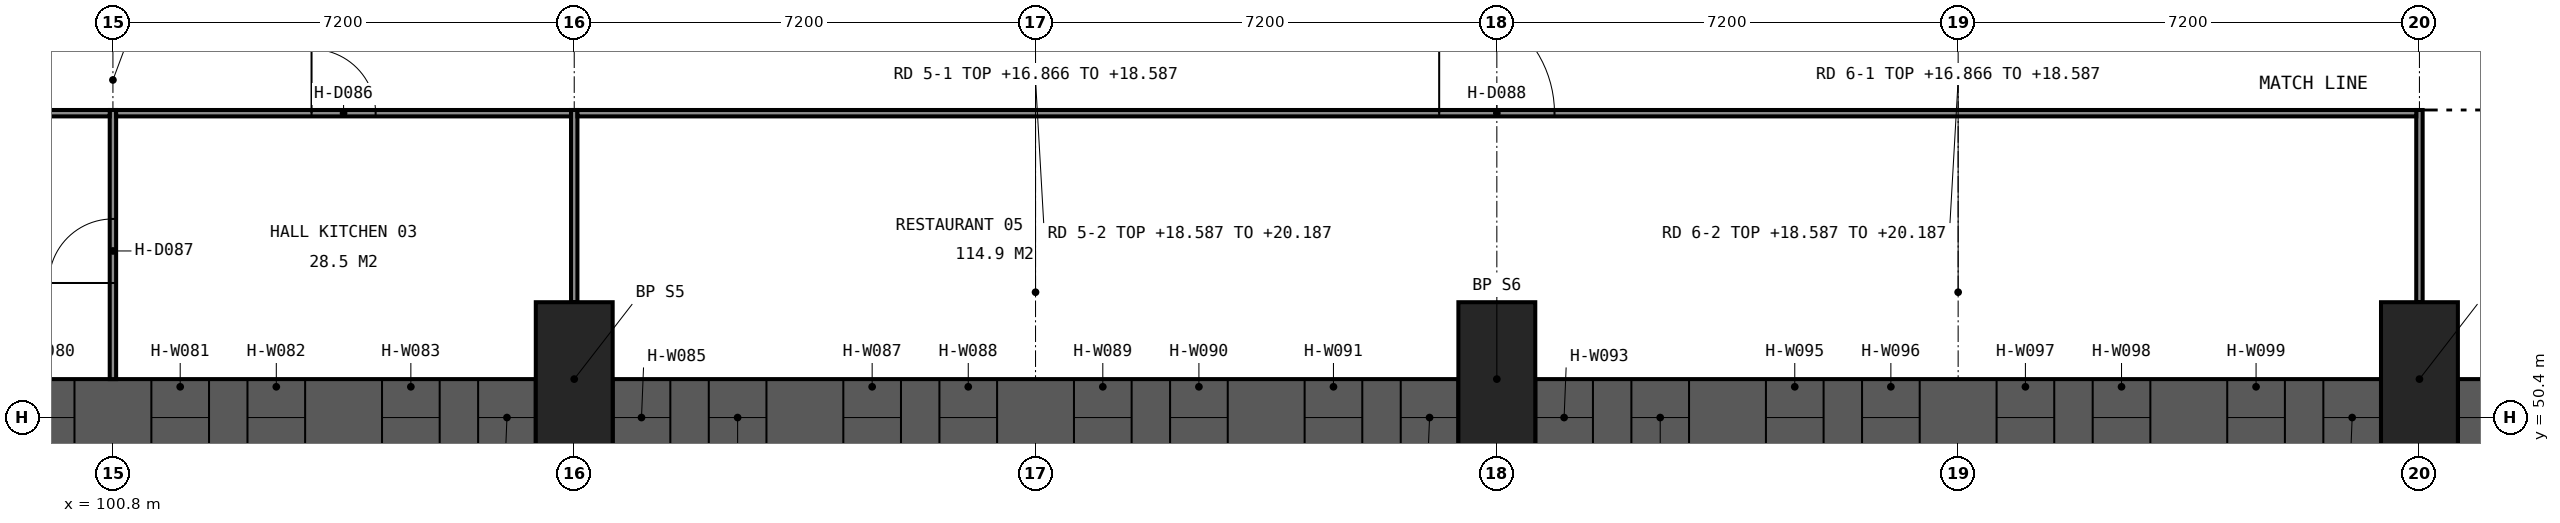
"""IFC4 building model, lengths in metres.
Left out: names, types, materials, properties, quantities, classifications, styles, units other than length and angle.
Written with IfcOpenShell. Run it as: python <this file> out.ifc"""

import sys

from ifc_helpers import new_model, si_unit, direction, frame, frame_2d, origin, origin_2d, place, context, subcontext, project, spatial, rectangle, extrude, element, fill, save


model = new_model("IFC4")
c1 = context("Model", 3, precision=1e-05, world=origin(), true_north=direction((0.0, 1.0)))
c2 = subcontext(c1, "Body", "Model", "MODEL_VIEW")
j1 = project(units=[si_unit("LENGTHUNIT", "METRE"), si_unit("PLANEANGLEUNIT", "RADIAN")], contexts=[c1])
p1 = place(None, origin())
s1 = spatial("IfcSite", under=j1, at=p1, CompositionType="ELEMENT")
p2 = place(p1, origin())
s2 = spatial("IfcBuilding", under=s1, at=p2, CompositionType="ELEMENT")
p3 = place(p2, frame((0.0, 0.0, 9.6)))
s3 = spatial("IfcBuildingStorey", under=s2, at=p3, CompositionType="ELEMENT", Elevation=9.6)
for number, where, z_axis, x_axis in (
    (1, (108.0, 51.0, 0.0), (0.0, 0.0, 1.0), (1.0, 0.0, 0.0)),
    (2, (122.4, 51.0, 0.0), (0.0, 0.0, 1.0), (1.0, 0.0, 0.0)),
    (3, (136.8, 51.0, 0.0), (0.0, 0.0, 1.0), (1.0, 0.0, 0.0)),
):
    element("IfcColumn", number, at=place(p3, frame(where, z_axis=z_axis, x_axis=x_axis)), inside=s3, PredefinedType="COLUMN", context=c2, shape_type="SweptSolid", body=[
        extrude(rectangle(XDim=1.2, YDim=2.4, at=origin_2d()), origin(), (0.0, 0.0, 1.0), 5.4),
    ])
p4 = place(p3, frame((94.2, 50.4, 0.0), z_axis=(0.0, 0.0, 1.0), x_axis=(1.0, 0.0, 0.0)))
e4 = element("IfcWall", 4, at=p4, inside=s3, PredefinedType="SOLIDWALL", context=c2, shape_type="SweptSolid", body=[
    extrude(rectangle(XDim=13.2, YDim=1.2, at=frame_2d((6.6, 0.0))), origin(), (0.0, 0.0, 1.0), 6.6),
])
p5 = place(p4, frame((0.0, 0.0, 1.2)))
e5 = element("IfcOpeningElement", 5, at=p5, cuts=e4, PredefinedType="OPENING", context=c2, shape_type="SweptSolid", body=[
    extrude(rectangle(XDim=0.9, YDim=4.5, at=frame_2d((0.45, 2.25))), frame((0.0, 0.61, 0.0), z_axis=(0.0, -1.0, 0.0), x_axis=(1.0, 0.0, 0.0)), (0.0, 0.0, 1.0), 1.22),
])
p6 = place(p4, frame((1.5, 0.0, 1.2)))
e6 = element("IfcOpeningElement", 6, at=p6, cuts=e4, PredefinedType="OPENING", context=c2, shape_type="SweptSolid", body=[
    extrude(rectangle(XDim=0.9, YDim=4.5, at=frame_2d((0.45, 2.25))), frame((0.0, 0.61, 0.0), z_axis=(0.0, -1.0, 0.0), x_axis=(1.0, 0.0, 0.0)), (0.0, 0.0, 1.0), 1.22),
])
p7 = place(p4, frame((3.6, 0.0, 1.2)))
e7 = element("IfcOpeningElement", 7, at=p7, cuts=e4, PredefinedType="OPENING", context=c2, shape_type="SweptSolid", body=[
    extrude(rectangle(XDim=0.9, YDim=4.5, at=frame_2d((0.45, 2.25))), frame((0.0, 0.61, 0.0), z_axis=(0.0, -1.0, 0.0), x_axis=(1.0, 0.0, 0.0)), (0.0, 0.0, 1.0), 1.22),
])
p8 = place(p4, frame((5.1, 0.0, 1.2)))
e8 = element("IfcOpeningElement", 8, at=p8, cuts=e4, PredefinedType="OPENING", context=c2, shape_type="SweptSolid", body=[
    extrude(rectangle(XDim=0.9, YDim=4.5, at=frame_2d((0.45, 2.25))), frame((0.0, 0.61, 0.0), z_axis=(0.0, -1.0, 0.0), x_axis=(1.0, 0.0, 0.0)), (0.0, 0.0, 1.0), 1.22),
])
p9 = place(p4, frame((7.2, 0.0, 1.2)))
e9 = element("IfcOpeningElement", 9, at=p9, cuts=e4, PredefinedType="OPENING", context=c2, shape_type="SweptSolid", body=[
    extrude(rectangle(XDim=0.9, YDim=4.5, at=frame_2d((0.45, 2.25))), frame((0.0, 0.61, 0.0), z_axis=(0.0, -1.0, 0.0), x_axis=(1.0, 0.0, 0.0)), (0.0, 0.0, 1.0), 1.22),
])
p10 = place(p4, frame((8.7, 0.0, 1.2)))
e10 = element("IfcOpeningElement", 10, at=p10, cuts=e4, PredefinedType="OPENING", context=c2, shape_type="SweptSolid", body=[
    extrude(rectangle(XDim=0.9, YDim=4.5, at=frame_2d((0.45, 2.25))), frame((0.0, 0.61, 0.0), z_axis=(0.0, -1.0, 0.0), x_axis=(1.0, 0.0, 0.0)), (0.0, 0.0, 1.0), 1.22),
])
p11 = place(p4, frame((10.8, 0.0, 1.2)))
e11 = element("IfcOpeningElement", 11, at=p11, cuts=e4, PredefinedType="OPENING", context=c2, shape_type="SweptSolid", body=[
    extrude(rectangle(XDim=0.9, YDim=4.5, at=frame_2d((0.45, 2.25))), frame((0.0, 0.61, 0.0), z_axis=(0.0, -1.0, 0.0), x_axis=(1.0, 0.0, 0.0)), (0.0, 0.0, 1.0), 1.22),
])
p12 = place(p4, frame((12.3, 0.0, 1.2)))
e12 = element("IfcOpeningElement", 12, at=p12, cuts=e4, PredefinedType="OPENING", context=c2, shape_type="SweptSolid", body=[
    extrude(rectangle(XDim=0.9, YDim=4.5, at=frame_2d((0.45, 2.25))), frame((0.0, 0.61, 0.0), z_axis=(0.0, -1.0, 0.0), x_axis=(1.0, 0.0, 0.0)), (0.0, 0.0, 1.0), 1.22),
])
p13 = place(p3, frame((108.6, 50.4, 0.0), z_axis=(0.0, 0.0, 1.0), x_axis=(1.0, 0.0, 0.0)))
e13 = element("IfcWall", 13, at=p13, inside=s3, PredefinedType="SOLIDWALL", context=c2, shape_type="SweptSolid", body=[
    extrude(rectangle(XDim=13.2, YDim=1.2, at=frame_2d((6.6, 0.0))), origin(), (0.0, 0.0, 1.0), 6.6),
])
p14 = place(p13, frame((0.0, 0.0, 1.2)))
e14 = element("IfcOpeningElement", 14, at=p14, cuts=e13, PredefinedType="OPENING", context=c2, shape_type="SweptSolid", body=[
    extrude(rectangle(XDim=0.9, YDim=4.5, at=frame_2d((0.45, 2.25))), frame((0.0, 0.61, 0.0), z_axis=(0.0, -1.0, 0.0), x_axis=(1.0, 0.0, 0.0)), (0.0, 0.0, 1.0), 1.22),
])
p15 = place(p13, frame((1.5, 0.0, 1.2)))
e15 = element("IfcOpeningElement", 15, at=p15, cuts=e13, PredefinedType="OPENING", context=c2, shape_type="SweptSolid", body=[
    extrude(rectangle(XDim=0.9, YDim=4.5, at=frame_2d((0.45, 2.25))), frame((0.0, 0.61, 0.0), z_axis=(0.0, -1.0, 0.0), x_axis=(1.0, 0.0, 0.0)), (0.0, 0.0, 1.0), 1.22),
])
p16 = place(p13, frame((3.6, 0.0, 1.2)))
e16 = element("IfcOpeningElement", 16, at=p16, cuts=e13, PredefinedType="OPENING", context=c2, shape_type="SweptSolid", body=[
    extrude(rectangle(XDim=0.9, YDim=4.5, at=frame_2d((0.45, 2.25))), frame((0.0, 0.61, 0.0), z_axis=(0.0, -1.0, 0.0), x_axis=(1.0, 0.0, 0.0)), (0.0, 0.0, 1.0), 1.22),
])
p17 = place(p13, frame((5.1, 0.0, 1.2)))
e17 = element("IfcOpeningElement", 17, at=p17, cuts=e13, PredefinedType="OPENING", context=c2, shape_type="SweptSolid", body=[
    extrude(rectangle(XDim=0.9, YDim=4.5, at=frame_2d((0.45, 2.25))), frame((0.0, 0.61, 0.0), z_axis=(0.0, -1.0, 0.0), x_axis=(1.0, 0.0, 0.0)), (0.0, 0.0, 1.0), 1.22),
])
p18 = place(p13, frame((7.2, 0.0, 1.2)))
e18 = element("IfcOpeningElement", 18, at=p18, cuts=e13, PredefinedType="OPENING", context=c2, shape_type="SweptSolid", body=[
    extrude(rectangle(XDim=0.9, YDim=4.5, at=frame_2d((0.45, 2.25))), frame((0.0, 0.61, 0.0), z_axis=(0.0, -1.0, 0.0), x_axis=(1.0, 0.0, 0.0)), (0.0, 0.0, 1.0), 1.22),
])
p19 = place(p13, frame((8.7, 0.0, 1.2)))
e19 = element("IfcOpeningElement", 19, at=p19, cuts=e13, PredefinedType="OPENING", context=c2, shape_type="SweptSolid", body=[
    extrude(rectangle(XDim=0.9, YDim=4.5, at=frame_2d((0.45, 2.25))), frame((0.0, 0.61, 0.0), z_axis=(0.0, -1.0, 0.0), x_axis=(1.0, 0.0, 0.0)), (0.0, 0.0, 1.0), 1.22),
])
p20 = place(p13, frame((10.8, 0.0, 1.2)))
e20 = element("IfcOpeningElement", 20, at=p20, cuts=e13, PredefinedType="OPENING", context=c2, shape_type="SweptSolid", body=[
    extrude(rectangle(XDim=0.9, YDim=4.5, at=frame_2d((0.45, 2.25))), frame((0.0, 0.61, 0.0), z_axis=(0.0, -1.0, 0.0), x_axis=(1.0, 0.0, 0.0)), (0.0, 0.0, 1.0), 1.22),
])
p21 = place(p13, frame((12.3, 0.0, 1.2)))
e21 = element("IfcOpeningElement", 21, at=p21, cuts=e13, PredefinedType="OPENING", context=c2, shape_type="SweptSolid", body=[
    extrude(rectangle(XDim=0.9, YDim=4.5, at=frame_2d((0.45, 2.25))), frame((0.0, 0.61, 0.0), z_axis=(0.0, -1.0, 0.0), x_axis=(1.0, 0.0, 0.0)), (0.0, 0.0, 1.0), 1.22),
])
p22 = place(p3, frame((123.0, 50.4, 0.0), z_axis=(0.0, 0.0, 1.0), x_axis=(1.0, 0.0, 0.0)))
e22 = element("IfcWall", 22, at=p22, inside=s3, PredefinedType="SOLIDWALL", context=c2, shape_type="SweptSolid", body=[
    extrude(rectangle(XDim=13.2, YDim=1.2, at=frame_2d((6.6, 0.0))), origin(), (0.0, 0.0, 1.0), 6.6),
])
p23 = place(p22, frame((0.0, 0.0, 1.2)))
e23 = element("IfcOpeningElement", 23, at=p23, cuts=e22, PredefinedType="OPENING", context=c2, shape_type="SweptSolid", body=[
    extrude(rectangle(XDim=0.9, YDim=4.5, at=frame_2d((0.45, 2.25))), frame((0.0, 0.61, 0.0), z_axis=(0.0, -1.0, 0.0), x_axis=(1.0, 0.0, 0.0)), (0.0, 0.0, 1.0), 1.22),
])
p24 = place(p22, frame((1.5, 0.0, 1.2)))
e24 = element("IfcOpeningElement", 24, at=p24, cuts=e22, PredefinedType="OPENING", context=c2, shape_type="SweptSolid", body=[
    extrude(rectangle(XDim=0.9, YDim=4.5, at=frame_2d((0.45, 2.25))), frame((0.0, 0.61, 0.0), z_axis=(0.0, -1.0, 0.0), x_axis=(1.0, 0.0, 0.0)), (0.0, 0.0, 1.0), 1.22),
])
p25 = place(p22, frame((3.6, 0.0, 1.2)))
e25 = element("IfcOpeningElement", 25, at=p25, cuts=e22, PredefinedType="OPENING", context=c2, shape_type="SweptSolid", body=[
    extrude(rectangle(XDim=0.9, YDim=4.5, at=frame_2d((0.45, 2.25))), frame((0.0, 0.61, 0.0), z_axis=(0.0, -1.0, 0.0), x_axis=(1.0, 0.0, 0.0)), (0.0, 0.0, 1.0), 1.22),
])
p26 = place(p22, frame((5.1, 0.0, 1.2)))
e26 = element("IfcOpeningElement", 26, at=p26, cuts=e22, PredefinedType="OPENING", context=c2, shape_type="SweptSolid", body=[
    extrude(rectangle(XDim=0.9, YDim=4.5, at=frame_2d((0.45, 2.25))), frame((0.0, 0.61, 0.0), z_axis=(0.0, -1.0, 0.0), x_axis=(1.0, 0.0, 0.0)), (0.0, 0.0, 1.0), 1.22),
])
p27 = place(p22, frame((7.2, 0.0, 1.2)))
e27 = element("IfcOpeningElement", 27, at=p27, cuts=e22, PredefinedType="OPENING", context=c2, shape_type="SweptSolid", body=[
    extrude(rectangle(XDim=0.9, YDim=4.5, at=frame_2d((0.45, 2.25))), frame((0.0, 0.61, 0.0), z_axis=(0.0, -1.0, 0.0), x_axis=(1.0, 0.0, 0.0)), (0.0, 0.0, 1.0), 1.22),
])
p28 = place(p22, frame((8.7, 0.0, 1.2)))
e28 = element("IfcOpeningElement", 28, at=p28, cuts=e22, PredefinedType="OPENING", context=c2, shape_type="SweptSolid", body=[
    extrude(rectangle(XDim=0.9, YDim=4.5, at=frame_2d((0.45, 2.25))), frame((0.0, 0.61, 0.0), z_axis=(0.0, -1.0, 0.0), x_axis=(1.0, 0.0, 0.0)), (0.0, 0.0, 1.0), 1.22),
])
p29 = place(p22, frame((10.8, 0.0, 1.2)))
e29 = element("IfcOpeningElement", 29, at=p29, cuts=e22, PredefinedType="OPENING", context=c2, shape_type="SweptSolid", body=[
    extrude(rectangle(XDim=0.9, YDim=4.5, at=frame_2d((0.45, 2.25))), frame((0.0, 0.61, 0.0), z_axis=(0.0, -1.0, 0.0), x_axis=(1.0, 0.0, 0.0)), (0.0, 0.0, 1.0), 1.22),
])
p30 = place(p22, frame((12.3, 0.0, 1.2)))
e30 = element("IfcOpeningElement", 30, at=p30, cuts=e22, PredefinedType="OPENING", context=c2, shape_type="SweptSolid", body=[
    extrude(rectangle(XDim=0.9, YDim=4.5, at=frame_2d((0.45, 2.25))), frame((0.0, 0.61, 0.0), z_axis=(0.0, -1.0, 0.0), x_axis=(1.0, 0.0, 0.0)), (0.0, 0.0, 1.0), 1.22),
])
p31 = place(p3, frame((137.4, 50.4, 0.0), z_axis=(0.0, 0.0, 1.0), x_axis=(1.0, 0.0, 0.0)))
e31 = element("IfcWall", 31, at=p31, inside=s3, PredefinedType="SOLIDWALL", context=c2, shape_type="SweptSolid", body=[
    extrude(rectangle(XDim=13.2, YDim=1.2, at=frame_2d((6.6, 0.0))), origin(), (0.0, 0.0, 1.0), 6.6),
])
p32 = place(p31, frame((0.0, 0.0, 1.2)))
e32 = element("IfcOpeningElement", 32, at=p32, cuts=e31, PredefinedType="OPENING", context=c2, shape_type="SweptSolid", body=[
    extrude(rectangle(XDim=0.9, YDim=4.5, at=frame_2d((0.45, 2.25))), frame((0.0, 0.61, 0.0), z_axis=(0.0, -1.0, 0.0), x_axis=(1.0, 0.0, 0.0)), (0.0, 0.0, 1.0), 1.22),
])
p33 = place(p31, frame((1.5, 0.0, 1.2)))
e33 = element("IfcOpeningElement", 33, at=p33, cuts=e31, PredefinedType="OPENING", context=c2, shape_type="SweptSolid", body=[
    extrude(rectangle(XDim=0.9, YDim=4.5, at=frame_2d((0.45, 2.25))), frame((0.0, 0.61, 0.0), z_axis=(0.0, -1.0, 0.0), x_axis=(1.0, 0.0, 0.0)), (0.0, 0.0, 1.0), 1.22),
])
p34 = place(p31, frame((3.6, 0.0, 1.2)))
e34 = element("IfcOpeningElement", 34, at=p34, cuts=e31, PredefinedType="OPENING", context=c2, shape_type="SweptSolid", body=[
    extrude(rectangle(XDim=0.9, YDim=4.5, at=frame_2d((0.45, 2.25))), frame((0.0, 0.61, 0.0), z_axis=(0.0, -1.0, 0.0), x_axis=(1.0, 0.0, 0.0)), (0.0, 0.0, 1.0), 1.22),
])
p35 = place(p31, frame((5.1, 0.0, 1.2)))
e35 = element("IfcOpeningElement", 35, at=p35, cuts=e31, PredefinedType="OPENING", context=c2, shape_type="SweptSolid", body=[
    extrude(rectangle(XDim=0.9, YDim=4.5, at=frame_2d((0.45, 2.25))), frame((0.0, 0.61, 0.0), z_axis=(0.0, -1.0, 0.0), x_axis=(1.0, 0.0, 0.0)), (0.0, 0.0, 1.0), 1.22),
])
p36 = place(p31, frame((7.2, 0.0, 1.2)))
e36 = element("IfcOpeningElement", 36, at=p36, cuts=e31, PredefinedType="OPENING", context=c2, shape_type="SweptSolid", body=[
    extrude(rectangle(XDim=0.9, YDim=4.5, at=frame_2d((0.45, 2.25))), frame((0.0, 0.61, 0.0), z_axis=(0.0, -1.0, 0.0), x_axis=(1.0, 0.0, 0.0)), (0.0, 0.0, 1.0), 1.22),
])
p37 = place(p31, frame((8.7, 0.0, 1.2)))
e37 = element("IfcOpeningElement", 37, at=p37, cuts=e31, PredefinedType="OPENING", context=c2, shape_type="SweptSolid", body=[
    extrude(rectangle(XDim=0.9, YDim=4.5, at=frame_2d((0.45, 2.25))), frame((0.0, 0.61, 0.0), z_axis=(0.0, -1.0, 0.0), x_axis=(1.0, 0.0, 0.0)), (0.0, 0.0, 1.0), 1.22),
])
p38 = place(p31, frame((10.8, 0.0, 1.2)))
e38 = element("IfcOpeningElement", 38, at=p38, cuts=e31, PredefinedType="OPENING", context=c2, shape_type="SweptSolid", body=[
    extrude(rectangle(XDim=0.9, YDim=4.5, at=frame_2d((0.45, 2.25))), frame((0.0, 0.61, 0.0), z_axis=(0.0, -1.0, 0.0), x_axis=(1.0, 0.0, 0.0)), (0.0, 0.0, 1.0), 1.22),
])
p39 = place(p31, frame((12.3, 0.0, 1.2)))
e39 = element("IfcOpeningElement", 39, at=p39, cuts=e31, PredefinedType="OPENING", context=c2, shape_type="SweptSolid", body=[
    extrude(rectangle(XDim=0.9, YDim=4.5, at=frame_2d((0.45, 2.25))), frame((0.0, 0.61, 0.0), z_axis=(0.0, -1.0, 0.0), x_axis=(1.0, 0.0, 0.0)), (0.0, 0.0, 1.0), 1.22),
])
p40 = place(p3, frame((100.8, 51.0, 0.0), z_axis=(0.0, 0.0, 1.0), x_axis=(0.0, 1.0, 0.0)))
e40 = element("IfcWall", 40, at=p40, inside=s3, PredefinedType="PARTITIONING", context=c2, shape_type="SweptSolid", body=[
    extrude(rectangle(XDim=4.2, YDim=0.1, at=frame_2d((2.1, 0.0))), origin(), (0.0, 0.0, 1.0), 4.7),
])
p41 = place(p40, frame((1.5, 0.0, 0.0)))
e41 = element("IfcOpeningElement", 41, at=p41, cuts=e40, PredefinedType="OPENING", context=c2, shape_type="SweptSolid", body=[
    extrude(rectangle(XDim=1.0, YDim=2.1, at=frame_2d((0.5, 1.05))), frame((0.0, 0.06, 0.0), z_axis=(0.0, -1.0, 0.0), x_axis=(1.0, 0.0, 0.0)), (0.0, 0.0, 1.0), 0.12),
])
for number, where, z_axis, x_axis in (
    (42, (108.0, 52.2, 0.0), (0.0, 0.0, 1.0), (0.0, 1.0, 0.0)),
    (43, (136.8, 52.2, 0.0), (0.0, 0.0, 1.0), (0.0, 1.0, 0.0)),
):
    element("IfcWall", number, at=place(p3, frame(where, z_axis=z_axis, x_axis=x_axis)), inside=s3, PredefinedType="PARTITIONING", context=c2, shape_type="SweptSolid", body=[
        extrude(rectangle(XDim=3.0, YDim=0.1, at=frame_2d((1.5, 0.0))), origin(), (0.0, 0.0, 1.0), 4.7),
    ])
p42 = place(p3, frame((93.65, 55.15, 0.0), z_axis=(0.0, 0.0, 1.0), x_axis=(1.0, 0.0, 0.0)))
e44 = element("IfcWall", 44, at=p42, inside=s3, PredefinedType="PARTITIONING", context=c2, shape_type="SweptSolid", body=[
    extrude(rectangle(XDim=7.1, YDim=0.1, at=frame_2d((3.55, 0.0))), origin(), (0.0, 0.0, 1.0), 4.7),
])
p43 = place(p42, frame((2.65, 0.0, 0.0)))
e45 = element("IfcOpeningElement", 45, at=p43, cuts=e44, PredefinedType="OPENING", context=c2, shape_type="SweptSolid", body=[
    extrude(rectangle(XDim=1.8, YDim=2.1, at=frame_2d((0.9, 1.05))), frame((0.0, 0.06, 0.0), z_axis=(0.0, -1.0, 0.0), x_axis=(1.0, 0.0, 0.0)), (0.0, 0.0, 1.0), 0.12),
])
p44 = place(p3, frame((100.85, 55.15, 0.0), z_axis=(0.0, 0.0, 1.0), x_axis=(1.0, 0.0, 0.0)))
e46 = element("IfcWall", 46, at=p44, inside=s3, PredefinedType="PARTITIONING", context=c2, shape_type="SweptSolid", body=[
    extrude(rectangle(XDim=7.1, YDim=0.1, at=frame_2d((3.55, 0.0))), origin(), (0.0, 0.0, 1.0), 4.7),
])
p45 = place(p44, frame((3.05, 0.0, 0.0)))
e47 = element("IfcOpeningElement", 47, at=p45, cuts=e46, PredefinedType="OPENING", context=c2, shape_type="SweptSolid", body=[
    extrude(rectangle(XDim=1.0, YDim=2.1, at=frame_2d((0.5, 1.05))), frame((0.0, 0.06, 0.0), z_axis=(0.0, -1.0, 0.0), x_axis=(1.0, 0.0, 0.0)), (0.0, 0.0, 1.0), 0.12),
])
p46 = place(p3, frame((108.05, 55.15, 0.0), z_axis=(0.0, 0.0, 1.0), x_axis=(1.0, 0.0, 0.0)))
e48 = element("IfcWall", 48, at=p46, inside=s3, PredefinedType="PARTITIONING", context=c2, shape_type="SweptSolid", body=[
    extrude(rectangle(XDim=28.7, YDim=0.1, at=frame_2d((14.35, 0.0))), origin(), (0.0, 0.0, 1.0), 4.7),
])
p47 = place(p46, frame((13.45, 0.0, 0.0)))
e49 = element("IfcOpeningElement", 49, at=p47, cuts=e48, PredefinedType="OPENING", context=c2, shape_type="SweptSolid", body=[
    extrude(rectangle(XDim=1.8, YDim=2.1, at=frame_2d((0.9, 1.05))), frame((0.0, 0.06, 0.0), z_axis=(0.0, -1.0, 0.0), x_axis=(1.0, 0.0, 0.0)), (0.0, 0.0, 1.0), 0.12),
])
p48 = place(p45, origin())
e50 = element("IfcDoor", 50, at=p48, inside=s3, OperationType="SINGLE_SWING_LEFT", PredefinedType="DOOR", context=c2, shape_type="SweptSolid", body=[
    extrude(rectangle(XDim=1.0, YDim=2.1, at=frame_2d((0.5, 1.05))), frame((0.0, 0.025, 0.0), z_axis=(0.0, -1.0, 0.0), x_axis=(1.0, 0.0, 0.0)), (0.0, 0.0, 1.0), 0.05),
])
fill(e47, e50)
p49 = place(p41, origin())
e51 = element("IfcDoor", 51, at=p49, inside=s3, OperationType="SINGLE_SWING_LEFT", PredefinedType="DOOR", context=c2, shape_type="SweptSolid", body=[
    extrude(rectangle(XDim=1.0, YDim=2.1, at=frame_2d((0.5, 1.05))), frame((0.0, 0.025, 0.0), z_axis=(0.0, -1.0, 0.0), x_axis=(1.0, 0.0, 0.0)), (0.0, 0.0, 1.0), 0.05),
])
fill(e41, e51)
p50 = place(p47, origin())
e52 = element("IfcDoor", 52, at=p50, inside=s3, OperationType="DOUBLE_DOOR_SINGLE_SWING", PredefinedType="DOOR", context=c2, shape_type="SweptSolid", body=[
    extrude(rectangle(XDim=1.8, YDim=2.1, at=frame_2d((0.9, 1.05))), frame((0.0, 0.025, 0.0), z_axis=(0.0, -1.0, 0.0), x_axis=(1.0, 0.0, 0.0)), (0.0, 0.0, 1.0), 0.05),
])
fill(e49, e52)
save(model, sys.argv[1])
